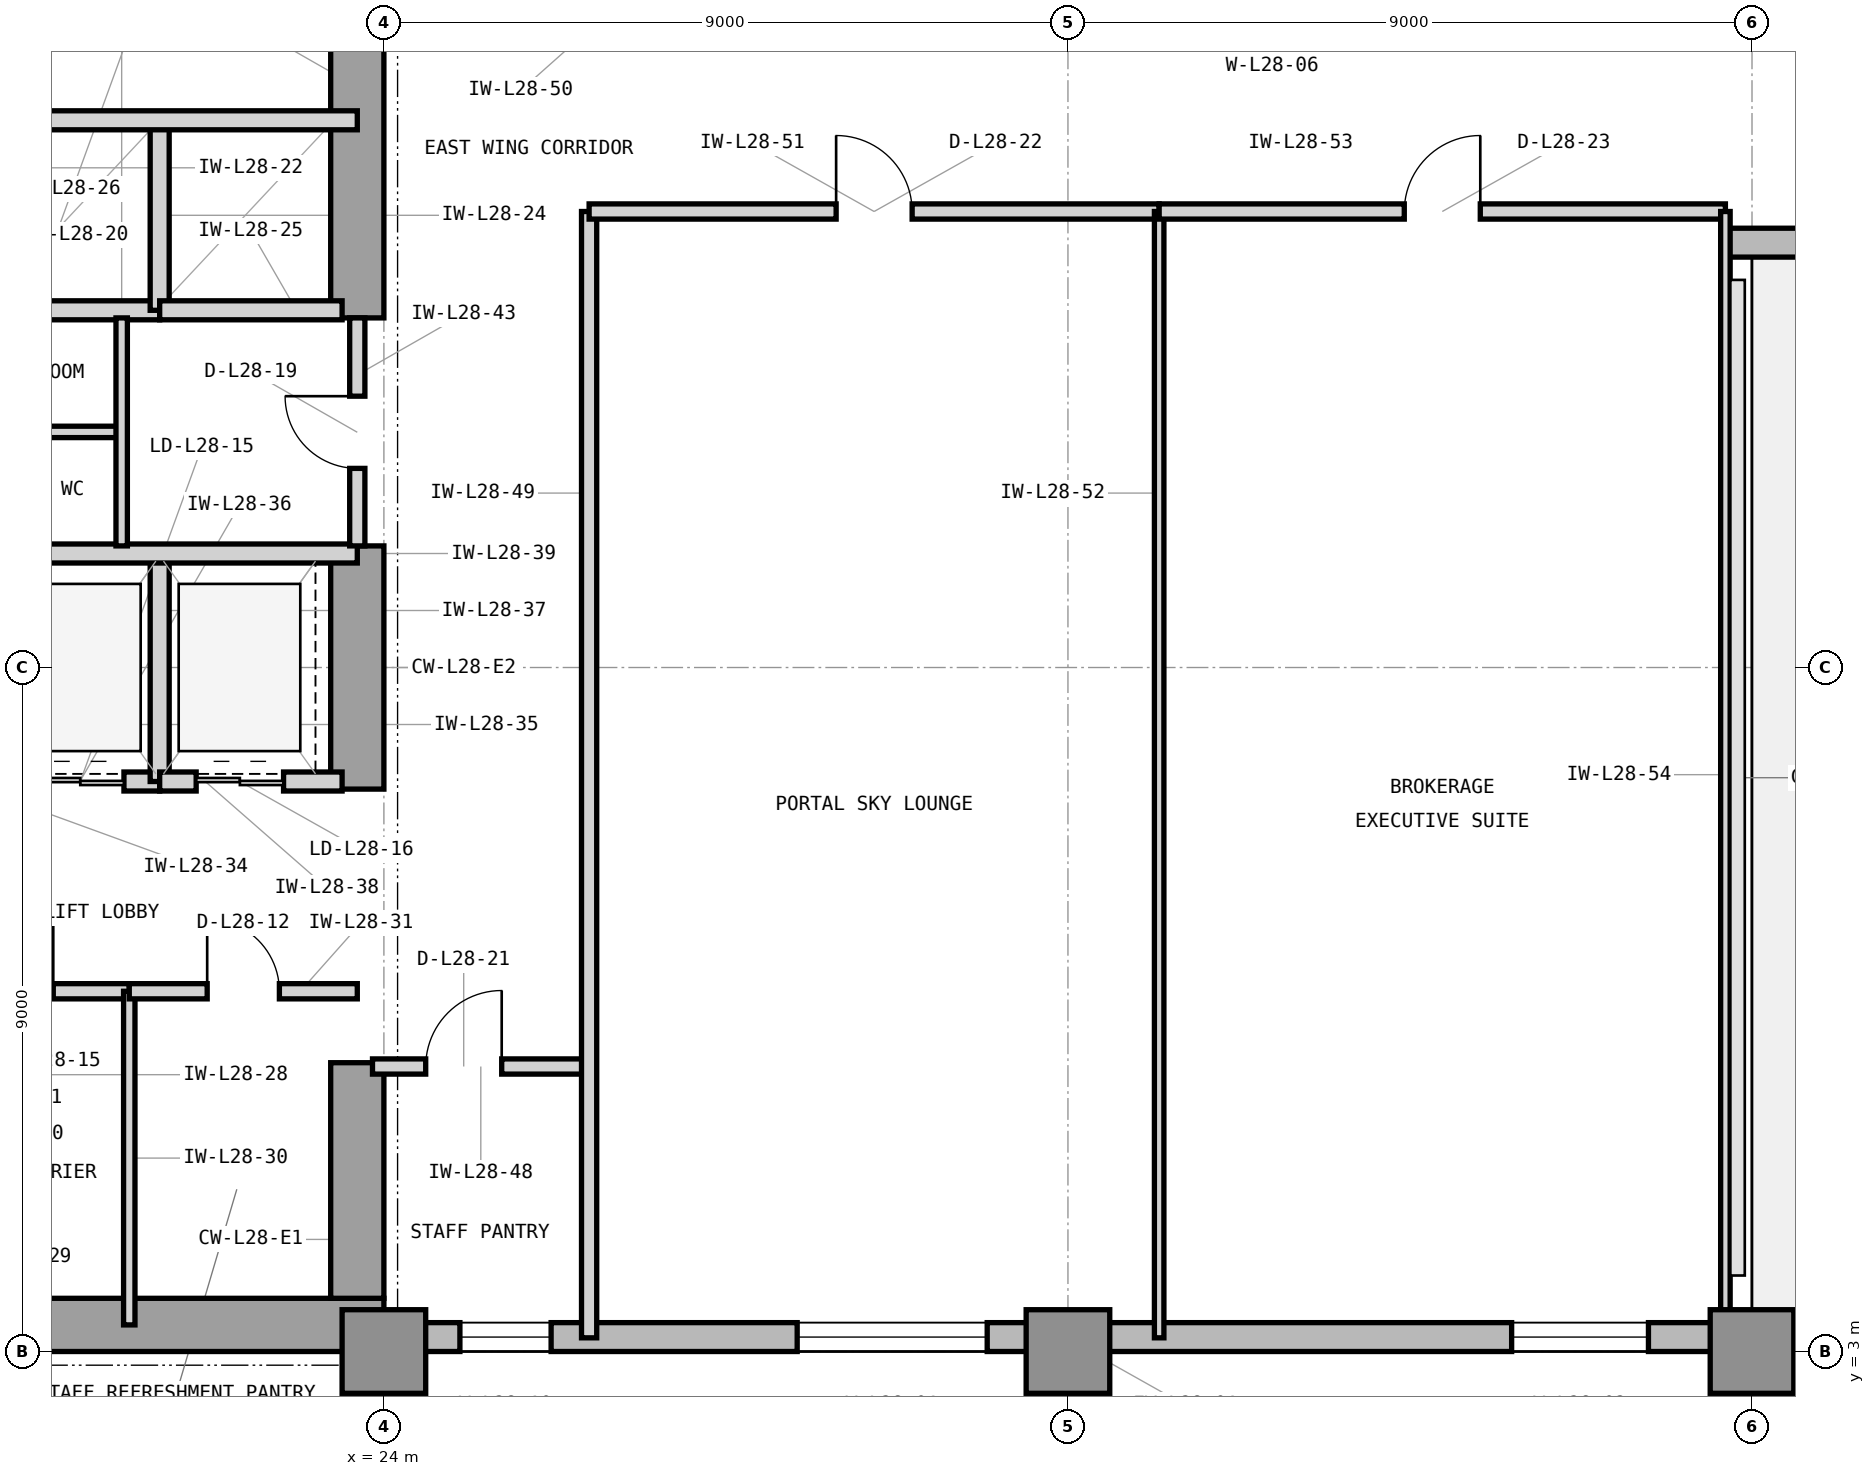
"""IFC4 building model, lengths in metres.
Left out: names, types, materials, properties, quantities, classifications, styles, units other than length and angle.
Written with IfcOpenShell. Run it as: python <this file> out.ifc"""

import sys

from ifc_helpers import new_model, si_unit, direction, frame, frame_2d, origin, origin_2d, place, context, subcontext, project, spatial, rectangle, extrude, element, fill, save


model = new_model("IFC4")
c1 = context("Model", 3, precision=1e-05, world=origin(), true_north=direction((0.0, 1.0)))
c2 = subcontext(c1, "Body", "Model", "MODEL_VIEW")
j1 = project(units=[si_unit("LENGTHUNIT", "METRE"), si_unit("PLANEANGLEUNIT", "RADIAN")], contexts=[c1])
p1 = place(None, origin())
s1 = spatial("IfcSite", under=j1, at=p1, CompositionType="ELEMENT")
p2 = place(p1, origin())
s2 = spatial("IfcBuilding", under=s1, at=p2, CompositionType="ELEMENT")
p3 = place(p2, frame((0.0, 0.0, 120.6)))
s3 = spatial("IfcBuildingStorey", under=s2, at=p3, CompositionType="ELEMENT", Elevation=120.6)
p4 = place(p3, frame((7.475, 3.35, 0.0), z_axis=(0.0, 0.0, 1.0), x_axis=(1.0, 0.0, 0.0)))
e1 = element("IfcWall", 1, at=p4, inside=s3, PredefinedType="SHEAR", context=c2, shape_type="SweptSolid", body=[
    extrude(rectangle(XDim=16.525, YDim=0.7, at=frame_2d((8.262, 0.0))), origin(), (0.0, 0.0, 1.0), 3.9),
])
p5 = place(p3, frame((23.65, 3.7, 0.0), z_axis=(0.0, 0.0, 1.0), x_axis=(0.0, 1.0, 0.0)))
e2 = element("IfcWall", 2, at=p5, inside=s3, PredefinedType="SHEAR", context=c2, shape_type="SweptSolid", body=[
    extrude(rectangle(XDim=3.1, YDim=0.7, at=frame_2d((1.55, 0.0))), origin(), (0.0, 0.0, 1.0), 3.9),
])
p6 = place(p3, frame((23.65, 10.4, 0.0), z_axis=(0.0, 0.0, 1.0), x_axis=(0.0, 1.0, 0.0)))
e3 = element("IfcWall", 3, at=p6, inside=s3, PredefinedType="SHEAR", context=c2, shape_type="SweptSolid", body=[
    extrude(rectangle(XDim=3.2, YDim=0.7, at=frame_2d((1.6, 0.0))), origin(), (0.0, 0.0, 1.0), 3.9),
])
p7 = place(p3, frame((23.65, 16.6, 0.0), z_axis=(0.0, 0.0, 1.0), x_axis=(0.0, 1.0, 0.0)))
e4 = element("IfcWall", 4, at=p7, inside=s3, PredefinedType="SHEAR", context=c2, shape_type="SweptSolid", body=[
    extrude(rectangle(XDim=4.05, YDim=0.7, at=frame_2d((2.025, 0.0))), origin(), (0.0, 0.0, 1.0), 3.9),
])
for number, where, z_axis, x_axis in (
    (5, (24.0, 3.0, 0.0), (0.0, 0.0, 1.0), (1.0, 0.0, 0.0)),
    (6, (33.0, 3.0, 0.0), (0.0, 0.0, 1.0), (1.0, 0.0, 0.0)),
    (7, (42.0, 3.0, 0.0), (0.0, 0.0, 1.0), (1.0, 0.0, 0.0)),
):
    element("IfcColumn", number, at=place(p3, frame(where, z_axis=z_axis, x_axis=x_axis)), inside=s3, PredefinedType="COLUMN", context=c2, shape_type="SweptSolid", body=[
        extrude(rectangle(XDim=1.1, YDim=1.1, at=origin_2d()), origin(), (0.0, 0.0, 1.0), 3.9),
    ])
p8 = place(p3, frame((23.9, 3.19, 0.0), z_axis=(0.0, 0.0, 1.0), x_axis=(1.0, 0.0, 0.0)))
e8 = element("IfcWall", 8, at=p8, inside=s3, PredefinedType="STANDARD", context=c2, shape_type="SweptSolid", body=[
    extrude(rectangle(XDim=18.1, YDim=0.38, at=frame_2d((9.05, 0.0))), origin(), (0.0, 0.0, 1.0), 3.7),
])
p9 = place(p8, frame((5.538, 0.0, 0.85)))
e9 = element("IfcOpeningElement", 9, at=p9, cuts=e8, PredefinedType="OPENING", context=c2, shape_type="SweptSolid", body=[
    extrude(rectangle(XDim=2.5, YDim=2.25, at=frame_2d((1.25, 1.125))), frame((0.0, 0.2, 0.0), z_axis=(0.0, -1.0, 0.0), x_axis=(1.0, 0.0, 0.0)), (0.0, 0.0, 1.0), 0.4),
])
p10 = place(p8, frame((14.938, 0.0, 0.85)))
e10 = element("IfcOpeningElement", 10, at=p10, cuts=e8, PredefinedType="OPENING", context=c2, shape_type="SweptSolid", body=[
    extrude(rectangle(XDim=1.8, YDim=2.25, at=frame_2d((0.9, 1.125))), frame((0.0, 0.2, 0.0), z_axis=(0.0, -1.0, 0.0), x_axis=(1.0, 0.0, 0.0)), (0.0, 0.0, 1.0), 0.4),
])
p11 = place(p8, frame((1.1, 0.0, 0.85)))
e11 = element("IfcOpeningElement", 11, at=p11, cuts=e8, PredefinedType="OPENING", context=c2, shape_type="SweptSolid", body=[
    extrude(rectangle(XDim=1.2, YDim=2.25, at=frame_2d((0.6, 1.125))), frame((0.0, 0.2, 0.0), z_axis=(0.0, -1.0, 0.0), x_axis=(1.0, 0.0, 0.0)), (0.0, 0.0, 1.0), 0.4),
])
p12 = place(p3, frame((41.7, 17.59, 0.0), z_axis=(0.0, 0.0, 1.0), x_axis=(1.0, 0.0, 0.0)))
e12 = element("IfcWall", 12, at=p12, inside=s3, PredefinedType="STANDARD", context=c2, shape_type="SweptSolid", body=[
    extrude(rectangle(XDim=9.5, YDim=0.38, at=frame_2d((4.75, 0.0))), origin(), (0.0, 0.0, 1.0), 3.7),
])
p13 = place(p12, frame((3.9, 0.0, 0.0)))
e13 = element("IfcOpeningElement", 13, at=p13, cuts=e12, PredefinedType="OPENING", context=c2, shape_type="SweptSolid", body=[
    extrude(rectangle(XDim=1.8, YDim=2.35, at=frame_2d((0.9, 1.175))), frame((0.0, 0.2, 0.0), z_axis=(0.0, -1.0, 0.0), x_axis=(1.0, 0.0, 0.0)), (0.0, 0.0, 1.0), 0.4),
])
p14 = place(p3, frame((18.75, 16.7, 0.0), z_axis=(0.0, 0.0, 1.0), x_axis=(1.0, 0.0, 0.0)))
e14 = element("IfcWall", 14, at=p14, inside=s3, PredefinedType="PARTITIONING", context=c2, shape_type="SweptSolid", body=[
    extrude(rectangle(XDim=2.3, YDim=0.25, at=frame_2d((1.15, 0.0))), origin(), (0.0, 0.0, 1.0), 3.227),
])
p15 = place(p3, frame((21.05, 16.7, 0.0), z_axis=(0.0, 0.0, 1.0), x_axis=(0.0, 1.0, 0.0)))
e15 = element("IfcWall", 15, at=p15, inside=s3, PredefinedType="PARTITIONING", context=c2, shape_type="SweptSolid", body=[
    extrude(rectangle(XDim=2.5, YDim=0.25, at=frame_2d((1.25, 0.0))), origin(), (0.0, 0.0, 1.0), 3.69),
])
p16 = place(p3, frame((21.05, 16.7, 0.0), z_axis=(0.0, 0.0, 1.0), x_axis=(1.0, 0.0, 0.0)))
e16 = element("IfcWall", 16, at=p16, inside=s3, PredefinedType="PARTITIONING", context=c2, shape_type="SweptSolid", body=[
    extrude(rectangle(XDim=2.4, YDim=0.25, at=frame_2d((1.2, 0.0))), origin(), (0.0, 0.0, 1.0), 3.227),
])
p17 = place(p3, frame((16.45, 19.2, 0.0), z_axis=(0.0, 0.0, 1.0), x_axis=(1.0, 0.0, 0.0)))
e17 = element("IfcWall", 17, at=p17, inside=s3, PredefinedType="PARTITIONING", context=c2, shape_type="SweptSolid", body=[
    extrude(rectangle(XDim=7.2, YDim=0.25, at=frame_2d((3.6, 0.0))), origin(), (0.0, 0.0, 1.0), 3.69),
])
p18 = place(p3, frame((17.65, 7.74, 0.0), z_axis=(0.0, 0.0, 1.0), x_axis=(1.0, 0.0, 0.0)))
e18 = element("IfcWall", 18, at=p18, inside=s3, PredefinedType="PARTITIONING", context=c2, shape_type="SweptSolid", body=[
    extrude(rectangle(XDim=3.0, YDim=0.2, at=frame_2d((1.5, 0.0))), origin(), (0.0, 0.0, 1.0), 3.69),
])
p19 = place(p18, frame((1.0, 0.0, 0.0)))
e19 = element("IfcOpeningElement", 19, at=p19, cuts=e18, PredefinedType="OPENING", context=c2, shape_type="SweptSolid", body=[
    extrude(rectangle(XDim=1.0, YDim=2.15, at=frame_2d((0.5, 1.075))), frame((0.0, 0.11, 0.0), z_axis=(0.0, -1.0, 0.0), x_axis=(1.0, 0.0, 0.0)), (0.0, 0.0, 1.0), 0.22),
])
p20 = place(p3, frame((20.65, 3.35, 0.0), z_axis=(0.0, 0.0, 1.0), x_axis=(0.0, 1.0, 0.0)))
e20 = element("IfcWall", 20, at=p20, inside=s3, PredefinedType="PARTITIONING", context=c2, shape_type="SweptSolid", body=[
    extrude(rectangle(XDim=4.39, YDim=0.15, at=frame_2d((2.195, 0.0))), origin(), (0.0, 0.0, 1.0), 3.69),
])
p21 = place(p3, frame((20.65, 7.74, 0.0), z_axis=(0.0, 0.0, 1.0), x_axis=(1.0, 0.0, 0.0)))
e21 = element("IfcWall", 21, at=p21, inside=s3, PredefinedType="PARTITIONING", context=c2, shape_type="SweptSolid", body=[
    extrude(rectangle(XDim=3.0, YDim=0.2, at=frame_2d((1.5, 0.0))), origin(), (0.0, 0.0, 1.0), 3.69),
])
p22 = place(p21, frame((1.025, 0.0, 0.0)))
e22 = element("IfcOpeningElement", 22, at=p22, cuts=e21, PredefinedType="OPENING", context=c2, shape_type="SweptSolid", body=[
    extrude(rectangle(XDim=0.95, YDim=2.1, at=frame_2d((0.475, 1.05))), frame((0.0, 0.11, 0.0), z_axis=(0.0, -1.0, 0.0), x_axis=(1.0, 0.0, 0.0)), (0.0, 0.0, 1.0), 0.22),
])
p23 = place(p3, frame((18.95, 10.5, 0.0), z_axis=(0.0, 0.0, 1.0), x_axis=(1.0, 0.0, 0.0)))
e23 = element("IfcWall", 23, at=p23, inside=s3, PredefinedType="PARTITIONING", context=c2, shape_type="SweptSolid", body=[
    extrude(rectangle(XDim=2.1, YDim=0.25, at=frame_2d((1.05, 0.0))), origin(), (0.0, 0.0, 1.0), 3.227),
])
p24 = place(p23, frame((0.48, 0.0, 0.0)))
e24 = element("IfcOpeningElement", 24, at=p24, cuts=e23, PredefinedType="OPENING", context=c2, shape_type="SweptSolid", body=[
    extrude(rectangle(XDim=1.15, YDim=2.25, at=frame_2d((0.575, 1.125))), frame((0.0, 0.135, 0.0), z_axis=(0.0, -1.0, 0.0), x_axis=(1.0, 0.0, 0.0)), (0.0, 0.0, 1.0), 0.27),
])
p25 = place(p3, frame((21.05, 10.5, 0.0), z_axis=(0.0, 0.0, 1.0), x_axis=(0.0, 1.0, 0.0)))
e25 = element("IfcWall", 25, at=p25, inside=s3, PredefinedType="PARTITIONING", context=c2, shape_type="SweptSolid", body=[
    extrude(rectangle(XDim=3.0, YDim=0.25, at=frame_2d((1.5, 0.0))), origin(), (0.0, 0.0, 1.0), 3.69),
])
p26 = place(p3, frame((21.05, 10.5, 0.0), z_axis=(0.0, 0.0, 1.0), x_axis=(1.0, 0.0, 0.0)))
e26 = element("IfcWall", 26, at=p26, inside=s3, PredefinedType="PARTITIONING", context=c2, shape_type="SweptSolid", body=[
    extrude(rectangle(XDim=2.4, YDim=0.25, at=frame_2d((1.2, 0.0))), origin(), (0.0, 0.0, 1.0), 3.227),
])
p27 = place(p26, frame((0.48, 0.0, 0.0)))
e27 = element("IfcOpeningElement", 27, at=p27, cuts=e26, PredefinedType="OPENING", context=c2, shape_type="SweptSolid", body=[
    extrude(rectangle(XDim=1.15, YDim=2.25, at=frame_2d((0.575, 1.125))), frame((0.0, 0.135, 0.0), z_axis=(0.0, -1.0, 0.0), x_axis=(1.0, 0.0, 0.0)), (0.0, 0.0, 1.0), 0.27),
])
p28 = place(p3, frame((14.7, 13.5, 0.0), z_axis=(0.0, 0.0, 1.0), x_axis=(1.0, 0.0, 0.0)))
e28 = element("IfcWall", 28, at=p28, inside=s3, PredefinedType="PARTITIONING", context=c2, shape_type="SweptSolid", body=[
    extrude(rectangle(XDim=8.95, YDim=0.25, at=frame_2d((4.475, 0.0))), origin(), (0.0, 0.0, 1.0), 3.227),
])
p29 = place(p3, frame((16.6, 15.1, 0.0), z_axis=(0.0, 0.0, 1.0), x_axis=(1.0, 0.0, 0.0)))
e29 = element("IfcWall", 29, at=p29, inside=s3, PredefinedType="PARTITIONING", context=c2, shape_type="SweptSolid", body=[
    extrude(rectangle(XDim=3.95, YDim=0.15, at=frame_2d((1.975, 0.0))), origin(), (0.0, 0.0, 1.0), 3.69),
])
p30 = place(p3, frame((20.55, 13.6, 0.0), z_axis=(0.0, 0.0, 1.0), x_axis=(0.0, 1.0, 0.0)))
e30 = element("IfcWall", 30, at=p30, inside=s3, PredefinedType="PARTITIONING", context=c2, shape_type="SweptSolid", body=[
    extrude(rectangle(XDim=3.0, YDim=0.15, at=frame_2d((1.5, 0.0))), origin(), (0.0, 0.0, 1.0), 3.69),
])
p31 = place(p3, frame((23.65, 13.6, 0.0), z_axis=(0.0, 0.0, 1.0), x_axis=(0.0, 1.0, 0.0)))
e31 = element("IfcWall", 31, at=p31, inside=s3, PredefinedType="PARTITIONING", context=c2, shape_type="SweptSolid", body=[
    extrude(rectangle(XDim=3.0, YDim=0.2, at=frame_2d((1.5, 0.0))), origin(), (0.0, 0.0, 1.0), 3.69),
])
p32 = place(p31, frame((1.02, 0.0, 0.0)))
e32 = element("IfcOpeningElement", 32, at=p32, cuts=e31, PredefinedType="OPENING", context=c2, shape_type="SweptSolid", body=[
    extrude(rectangle(XDim=0.95, YDim=2.1, at=frame_2d((0.475, 1.05))), frame((0.0, 0.11, 0.0), z_axis=(0.0, -1.0, 0.0), x_axis=(1.0, 0.0, 0.0)), (0.0, 0.0, 1.0), 0.22),
])
p33 = place(p3, frame((23.85, 6.75, 0.0), z_axis=(0.0, 0.0, 1.0), x_axis=(1.0, 0.0, 0.0)))
e33 = element("IfcWall", 33, at=p33, inside=s3, PredefinedType="PARTITIONING", context=c2, shape_type="SweptSolid", body=[
    extrude(rectangle(XDim=2.85, YDim=0.2, at=frame_2d((1.425, 0.0))), origin(), (0.0, 0.0, 1.0), 3.69),
])
p34 = place(p33, frame((0.7, 0.0, 0.0)))
e34 = element("IfcOpeningElement", 34, at=p34, cuts=e33, PredefinedType="OPENING", context=c2, shape_type="SweptSolid", body=[
    extrude(rectangle(XDim=1.0, YDim=2.15, at=frame_2d((0.5, 1.075))), frame((0.0, 0.11, 0.0), z_axis=(0.0, -1.0, 0.0), x_axis=(1.0, 0.0, 0.0)), (0.0, 0.0, 1.0), 0.22),
])
p35 = place(p3, frame((26.7, 3.18, 0.0), z_axis=(0.0, 0.0, 1.0), x_axis=(0.0, 1.0, 0.0)))
e35 = element("IfcWall", 35, at=p35, inside=s3, PredefinedType="PARTITIONING", context=c2, shape_type="SweptSolid", body=[
    extrude(rectangle(XDim=14.82, YDim=0.2, at=frame_2d((7.41, 0.0))), origin(), (0.0, 0.0, 1.0), 3.69),
])
p36 = place(p3, frame((26.7, 18.0, 0.0), z_axis=(0.0, 0.0, 1.0), x_axis=(1.0, 0.0, 0.0)))
e36 = element("IfcWall", 36, at=p36, inside=s3, PredefinedType="PARTITIONING", context=c2, shape_type="SweptSolid", body=[
    extrude(rectangle(XDim=7.5, YDim=0.2, at=frame_2d((3.75, 0.0))), origin(), (0.0, 0.0, 1.0), 3.227),
])
p37 = place(p36, frame((3.25, 0.0, 0.0)))
e37 = element("IfcOpeningElement", 37, at=p37, cuts=e36, PredefinedType="OPENING", context=c2, shape_type="SweptSolid", body=[
    extrude(rectangle(XDim=1.0, YDim=2.15, at=frame_2d((0.5, 1.075))), frame((0.0, 0.11, 0.0), z_axis=(0.0, -1.0, 0.0), x_axis=(1.0, 0.0, 0.0)), (0.0, 0.0, 1.0), 0.22),
])
p38 = place(p3, frame((34.2, 3.18, 0.0), z_axis=(0.0, 0.0, 1.0), x_axis=(0.0, 1.0, 0.0)))
e38 = element("IfcWall", 38, at=p38, inside=s3, PredefinedType="PARTITIONING", context=c2, shape_type="SweptSolid", body=[
    extrude(rectangle(XDim=14.82, YDim=0.125, at=frame_2d((7.41, 0.0))), origin(), (0.0, 0.0, 1.0), 3.69),
])
p39 = place(p3, frame((34.2, 18.0, 0.0), z_axis=(0.0, 0.0, 1.0), x_axis=(1.0, 0.0, 0.0)))
e39 = element("IfcWall", 39, at=p39, inside=s3, PredefinedType="PARTITIONING", context=c2, shape_type="SweptSolid", body=[
    extrude(rectangle(XDim=7.45, YDim=0.2, at=frame_2d((3.725, 0.0))), origin(), (0.0, 0.0, 1.0), 3.227),
])
p40 = place(p39, frame((3.225, 0.0, 0.0)))
e40 = element("IfcOpeningElement", 40, at=p40, cuts=e39, PredefinedType="OPENING", context=c2, shape_type="SweptSolid", body=[
    extrude(rectangle(XDim=1.0, YDim=2.15, at=frame_2d((0.5, 1.075))), frame((0.0, 0.11, 0.0), z_axis=(0.0, -1.0, 0.0), x_axis=(1.0, 0.0, 0.0)), (0.0, 0.0, 1.0), 0.22),
])
p41 = place(p3, frame((41.65, 3.18, 0.0), z_axis=(0.0, 0.0, 1.0), x_axis=(0.0, 1.0, 0.0)))
e41 = element("IfcWall", 41, at=p41, inside=s3, PredefinedType="PARTITIONING", context=c2, shape_type="SweptSolid", body=[
    extrude(rectangle(XDim=14.82, YDim=0.125, at=frame_2d((7.41, 0.0))), origin(), (0.0, 0.0, 1.0), 3.69),
])
p42 = place(p9, origin())
e42 = element("IfcWindow", 42, at=p42, inside=s3, PartitioningType="SINGLE_PANEL", PredefinedType="WINDOW", context=c2, shape_type="SweptSolid", body=[
    extrude(rectangle(XDim=2.5, YDim=2.25, at=frame_2d((1.25, 1.125))), frame((0.0, 0.11, 0.0), z_axis=(0.0, -1.0, 0.0), x_axis=(1.0, 0.0, 0.0)), (0.0, 0.0, 1.0), 0.06),
])
fill(e9, e42)
p43 = place(p10, origin())
e43 = element("IfcWindow", 43, at=p43, inside=s3, PartitioningType="SINGLE_PANEL", PredefinedType="WINDOW", context=c2, shape_type="SweptSolid", body=[
    extrude(rectangle(XDim=1.8, YDim=2.25, at=frame_2d((0.9, 1.125))), frame((0.0, 0.11, 0.0), z_axis=(0.0, -1.0, 0.0), x_axis=(1.0, 0.0, 0.0)), (0.0, 0.0, 1.0), 0.06),
])
fill(e10, e43)
p44 = place(p19, origin())
e44 = element("IfcDoor", 44, at=p44, inside=s3, OperationType="SINGLE_SWING_RIGHT", PredefinedType="DOOR", context=c2, shape_type="SweptSolid", body=[
    extrude(rectangle(XDim=1.0, YDim=2.15, at=frame_2d((0.5, 1.075))), frame((0.0, 0.025, 0.0), z_axis=(0.0, -1.0, 0.0), x_axis=(1.0, 0.0, 0.0)), (0.0, 0.0, 1.0), 0.05),
])
fill(e19, e44)
p45 = place(p22, origin())
e45 = element("IfcDoor", 45, at=p45, inside=s3, OperationType="SINGLE_SWING_LEFT", PredefinedType="DOOR", context=c2, shape_type="SweptSolid", body=[
    extrude(rectangle(XDim=0.95, YDim=2.1, at=frame_2d((0.475, 1.05))), frame((0.0, 0.025, 0.0), z_axis=(0.0, -1.0, 0.0), x_axis=(1.0, 0.0, 0.0)), (0.0, 0.0, 1.0), 0.05),
])
fill(e22, e45)
p46 = place(p24, origin())
e46 = element("IfcDoor", 46, at=p46, inside=s3, OperationType="DOUBLE_DOOR_SLIDING", PredefinedType="DOOR", context=c2, shape_type="SweptSolid", body=[
    extrude(rectangle(XDim=1.15, YDim=2.25, at=frame_2d((0.575, 1.125))), frame((0.0, 0.025, 0.0), z_axis=(0.0, -1.0, 0.0), x_axis=(1.0, 0.0, 0.0)), (0.0, 0.0, 1.0), 0.05),
])
fill(e24, e46)
p47 = place(p27, origin())
e47 = element("IfcDoor", 47, at=p47, inside=s3, OperationType="DOUBLE_DOOR_SLIDING", PredefinedType="DOOR", context=c2, shape_type="SweptSolid", body=[
    extrude(rectangle(XDim=1.15, YDim=2.25, at=frame_2d((0.575, 1.125))), frame((0.0, 0.025, 0.0), z_axis=(0.0, -1.0, 0.0), x_axis=(1.0, 0.0, 0.0)), (0.0, 0.0, 1.0), 0.05),
])
fill(e27, e47)
p48 = place(p32, origin())
e48 = element("IfcDoor", 48, at=p48, inside=s3, OperationType="SINGLE_SWING_RIGHT", PredefinedType="DOOR", context=c2, shape_type="SweptSolid", body=[
    extrude(rectangle(XDim=0.95, YDim=2.1, at=frame_2d((0.475, 1.05))), frame((0.0, 0.025, 0.0), z_axis=(0.0, -1.0, 0.0), x_axis=(1.0, 0.0, 0.0)), (0.0, 0.0, 1.0), 0.05),
])
fill(e32, e48)
p49 = place(p34, origin())
e49 = element("IfcDoor", 49, at=p49, inside=s3, OperationType="SINGLE_SWING_RIGHT", PredefinedType="DOOR", context=c2, shape_type="SweptSolid", body=[
    extrude(rectangle(XDim=1.0, YDim=2.15, at=frame_2d((0.5, 1.075))), frame((0.0, 0.025, 0.0), z_axis=(0.0, -1.0, 0.0), x_axis=(1.0, 0.0, 0.0)), (0.0, 0.0, 1.0), 0.05),
])
fill(e34, e49)
p50 = place(p37, origin())
e50 = element("IfcDoor", 50, at=p50, inside=s3, OperationType="SINGLE_SWING_LEFT", PredefinedType="DOOR", context=c2, shape_type="SweptSolid", body=[
    extrude(rectangle(XDim=1.0, YDim=2.15, at=frame_2d((0.5, 1.075))), frame((0.0, 0.025, 0.0), z_axis=(0.0, -1.0, 0.0), x_axis=(1.0, 0.0, 0.0)), (0.0, 0.0, 1.0), 0.05),
])
fill(e37, e50)
p51 = place(p40, origin())
e51 = element("IfcDoor", 51, at=p51, inside=s3, OperationType="SINGLE_SWING_RIGHT", PredefinedType="DOOR", context=c2, shape_type="SweptSolid", body=[
    extrude(rectangle(XDim=1.0, YDim=2.15, at=frame_2d((0.5, 1.075))), frame((0.0, 0.025, 0.0), z_axis=(0.0, -1.0, 0.0), x_axis=(1.0, 0.0, 0.0)), (0.0, 0.0, 1.0), 0.05),
])
fill(e40, e51)
p52 = place(p11, origin())
e52 = element("IfcWindow", 52, at=p52, inside=s3, PartitioningType="SINGLE_PANEL", PredefinedType="WINDOW", context=c2, shape_type="SweptSolid", body=[
    extrude(rectangle(XDim=1.2, YDim=2.25, at=frame_2d((0.6, 1.125))), frame((0.0, 0.11, 0.0), z_axis=(0.0, -1.0, 0.0), x_axis=(1.0, 0.0, 0.0)), (0.0, 0.0, 1.0), 0.06),
])
fill(e11, e52)
save(model, sys.argv[1])
